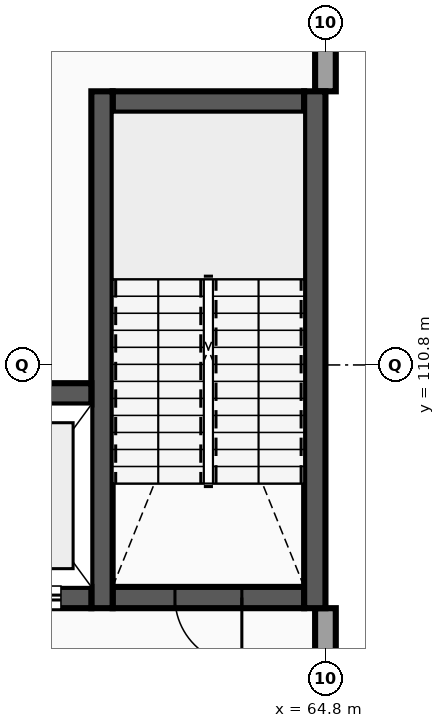
"""IFC4 building model, lengths in metres.
Left out: names, types, materials, properties, quantities, classifications, styles, units other than length and angle.
Written with IfcOpenShell. Run it as: python <this file> out.ifc"""

import sys

from ifc_helpers import new_model, si_unit, direction, frame, frame_2d, origin, place, context, subcontext, project, spatial, rectangle, extrude, element, fill, save


model = new_model("IFC4")
c1 = context("Model", 3, precision=1e-05, world=origin(), true_north=direction((0.0, 1.0)))
c2 = subcontext(c1, "Body", "Model", "MODEL_VIEW")
j1 = project(units=[si_unit("LENGTHUNIT", "METRE"), si_unit("PLANEANGLEUNIT", "RADIAN")], contexts=[c1])
p1 = place(None, origin())
s1 = spatial("IfcSite", under=j1, at=p1, CompositionType="ELEMENT")
p2 = place(p1, origin())
s2 = spatial("IfcBuilding", under=s1, at=p2, CompositionType="ELEMENT")
p3 = place(p2, frame((0.0, 0.0, 18.4)))
s3 = spatial("IfcBuildingStorey", under=s2, at=p3, CompositionType="ELEMENT", Elevation=18.4)
p4 = place(p3, frame((64.8, 103.6, 0.0), z_axis=(0.0, 0.0, 1.0), x_axis=(0.0, 1.0, 0.0)))
e1 = element("IfcWall", 1, at=p4, inside=s3, PredefinedType="STANDARD", context=c2, shape_type="SweptSolid", body=[
    extrude(rectangle(XDim=3.2, YDim=0.34, at=frame_2d((1.6, 0.0))), origin(), (0.0, 0.0, 1.0), 4.215),
])
p5 = place(p4, frame((1.17, 0.0, 0.95)))
e2 = element("IfcOpeningElement", 2, at=p5, cuts=e1, PredefinedType="OPENING", context=c2, shape_type="SweptSolid", body=[
    extrude(rectangle(XDim=0.86, YDim=1.296, at=frame_2d((0.43, 0.648))), frame((0.0, 0.18, 0.0), z_axis=(0.0, -1.0, 0.0), x_axis=(1.0, 0.0, 0.0)), (0.0, 0.0, 1.0), 0.36),
])
p6 = place(p3, frame((64.8, 115.3, 0.0), z_axis=(0.0, 0.0, 1.0), x_axis=(0.0, 1.0, 0.0)))
e3 = element("IfcWall", 3, at=p6, inside=s3, PredefinedType="STANDARD", context=c2, shape_type="SweptSolid", body=[
    extrude(rectangle(XDim=2.53, YDim=0.34, at=frame_2d((1.265, 0.0))), origin(), (0.0, 0.0, 1.0), 4.215),
])
p7 = place(p3, frame((61.3, 106.975, 0.0), z_axis=(0.0, 0.0, 1.0), x_axis=(1.0, 0.0, 0.0)))
e4 = element("IfcWall", 4, at=p7, inside=s3, PredefinedType="SHEAR", context=c2, shape_type="SweptSolid", body=[
    extrude(rectangle(XDim=3.15, YDim=0.35, at=frame_2d((1.575, 0.0))), origin(), (0.0, 0.0, 1.0), 4.215),
])
p8 = place(p7, frame((1.025, 0.0, 0.0)))
e5 = element("IfcOpeningElement", 5, at=p8, cuts=e4, PredefinedType="OPENING", context=c2, shape_type="SweptSolid", body=[
    extrude(rectangle(XDim=1.1, YDim=2.15, at=frame_2d((0.55, 1.075))), frame((0.0, 0.185, 0.0), z_axis=(0.0, -1.0, 0.0), x_axis=(1.0, 0.0, 0.0)), (0.0, 0.0, 1.0), 0.37),
])
p9 = place(p3, frame((61.3, 115.125, 0.0), z_axis=(0.0, 0.0, 1.0), x_axis=(1.0, 0.0, 0.0)))
e6 = element("IfcWall", 6, at=p9, inside=s3, PredefinedType="SHEAR", context=c2, shape_type="SweptSolid", body=[
    extrude(rectangle(XDim=3.15, YDim=0.35, at=frame_2d((1.575, 0.0))), origin(), (0.0, 0.0, 1.0), 4.215),
])
for number, where, z_axis, x_axis in (
    (7, (61.125, 106.8, 0.0), (0.0, 0.0, 1.0), (0.0, 1.0, 0.0)),
    (8, (64.625, 106.8, 0.0), (0.0, 0.0, 1.0), (0.0, 1.0, 0.0)),
):
    element("IfcWall", number, at=place(p3, frame(where, z_axis=z_axis, x_axis=x_axis)), inside=s3, PredefinedType="SHEAR", context=c2, shape_type="SweptSolid", body=[
        extrude(rectangle(XDim=8.5, YDim=0.35, at=frame_2d((4.25, 0.0))), origin(), (0.0, 0.0, 1.0), 4.215),
    ])
p10 = place(p3, frame((58.75, 106.975, 0.0), z_axis=(0.0, 0.0, 1.0), x_axis=(1.0, 0.0, 0.0)))
e9 = element("IfcWall", 9, at=p10, inside=s3, PredefinedType="SHEAR", context=c2, shape_type="SweptSolid", body=[
    extrude(rectangle(XDim=2.2, YDim=0.35, at=frame_2d((1.1, 0.0))), origin(), (0.0, 0.0, 1.0), 4.215),
])
p11 = place(p10, frame((0.5, 0.0, 0.0)))
e10 = element("IfcOpeningElement", 10, at=p11, cuts=e9, PredefinedType="OPENING", context=c2, shape_type="SweptSolid", body=[
    extrude(rectangle(XDim=1.2, YDim=2.2, at=frame_2d((0.6, 1.1))), frame((0.0, 0.185, 0.0), z_axis=(0.0, -1.0, 0.0), x_axis=(1.0, 0.0, 0.0)), (0.0, 0.0, 1.0), 0.37),
])
p12 = place(p3, frame((58.75, 110.325, 0.0), z_axis=(0.0, 0.0, 1.0), x_axis=(1.0, 0.0, 0.0)))
e11 = element("IfcWall", 11, at=p12, inside=s3, PredefinedType="SHEAR", context=c2, shape_type="SweptSolid", body=[
    extrude(rectangle(XDim=2.2, YDim=0.35, at=frame_2d((1.1, 0.0))), origin(), (0.0, 0.0, 1.0), 4.215),
])
p13 = place(p8, origin())
e12 = element("IfcDoor", 12, at=p13, inside=s3, OperationType="SINGLE_SWING_RIGHT", PredefinedType="DOOR", context=c2, shape_type="SweptSolid", body=[
    extrude(rectangle(XDim=1.1, YDim=2.15, at=frame_2d((0.55, 1.075))), frame((0.0, 0.025, 0.0), z_axis=(0.0, -1.0, 0.0), x_axis=(1.0, 0.0, 0.0)), (0.0, 0.0, 1.0), 0.05),
])
fill(e5, e12)
p14 = place(p11, origin())
e13 = element("IfcDoor", 13, at=p14, inside=s3, OperationType="SLIDING_TO_RIGHT", PredefinedType="DOOR", context=c2, shape_type="SweptSolid", body=[
    extrude(rectangle(XDim=1.2, YDim=2.2, at=frame_2d((0.6, 1.1))), frame((0.0, 0.025, 0.0), z_axis=(0.0, -1.0, 0.0), x_axis=(1.0, 0.0, 0.0)), (0.0, 0.0, 1.0), 0.05),
])
fill(e10, e13)
save(model, sys.argv[1])
